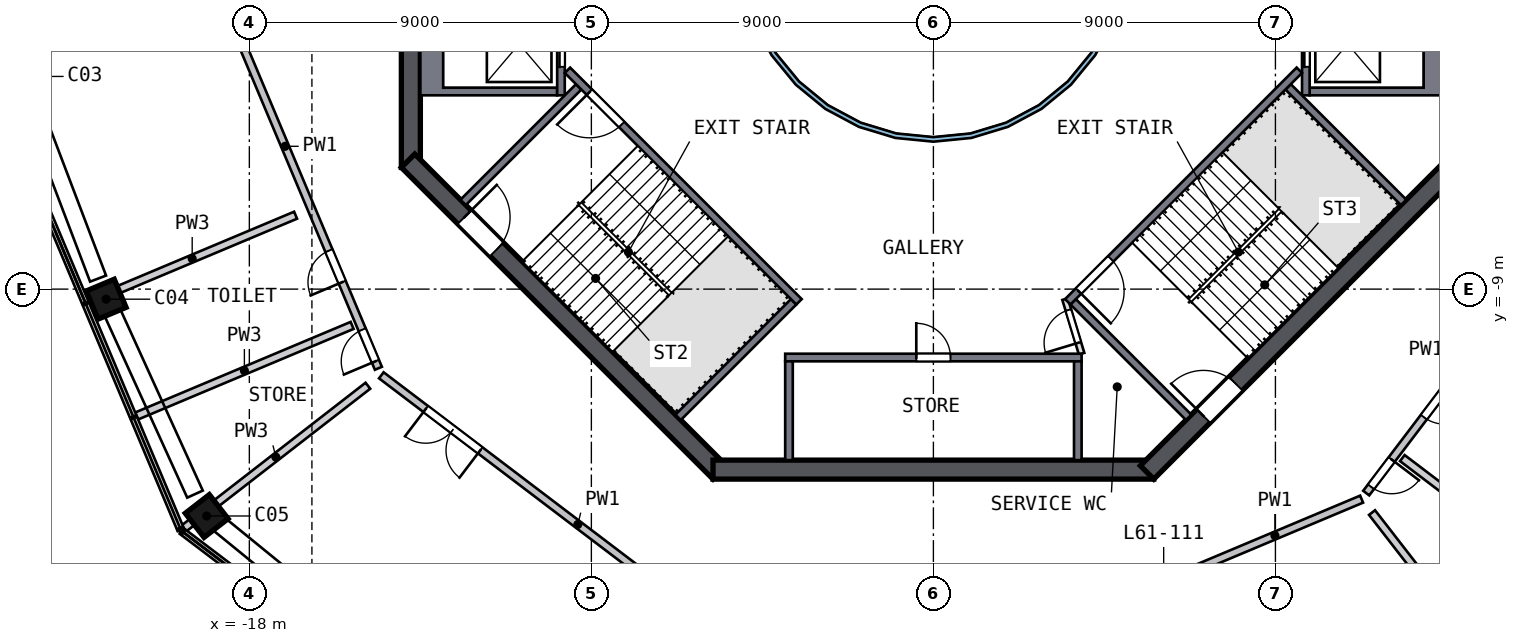
"""IFC4 building model, lengths in metres.
Left out: names, types, materials, properties, quantities, classifications, styles, units other than length and angle.
Written with IfcOpenShell. Run it as: python <this file> out.ifc"""

import sys

from ifc_helpers import new_model, si_unit, direction, frame, frame_2d, origin, origin_2d, place, context, subcontext, project, spatial, polyline, rectangle, outline, extrude, element, fill, save


model = new_model("IFC4")
c1 = context("Model", 3, precision=1e-05, world=origin(), true_north=direction((0.0, 1.0)))
c2 = subcontext(c1, "Body", "Model", "MODEL_VIEW")
j1 = project(units=[si_unit("LENGTHUNIT", "METRE"), si_unit("PLANEANGLEUNIT", "RADIAN")], contexts=[c1])
p1 = place(None, origin())
s1 = spatial("IfcSite", under=j1, at=p1, CompositionType="ELEMENT")
p2 = place(p1, origin())
s2 = spatial("IfcBuilding", under=s1, at=p2, CompositionType="ELEMENT")
p3 = place(p2, frame((0.0, 0.0, 248.0)))
s3 = spatial("IfcBuildingStorey", under=s2, at=p3, CompositionType="ELEMENT", Elevation=248.0)
p4 = place(p3, frame((-21.81, -9.168, 0.0), z_axis=(0.034709931, -0.080622231, 0.996140189), x_axis=(0.386169745, -0.918242206, -0.087773449)))
e1 = element("IfcColumn", 1, at=p4, inside=s3, PredefinedType="COLUMN", context=c2, shape_type="SweptSolid", body=[
    extrude(rectangle(XDim=0.8, YDim=0.8, at=origin_2d()), origin(), (0.0, 0.0, 1.0), 4.206),
])
p5 = place(p3, frame((-19.19, -14.885, 0.0), z_axis=(0.055826239, -0.070682286, 0.995935463), x_axis=(-0.610668678, 0.7867476, 0.090066533)))
e2 = element("IfcColumn", 2, at=p5, inside=s3, PredefinedType="COLUMN", context=c2, shape_type="SweptSolid", body=[
    extrude(rectangle(XDim=0.8, YDim=0.8, at=origin_2d()), origin(), (0.0, 0.0, 1.0), 4.207),
])
p6 = place(p3, frame((-13.75, 5.799, 0.0), z_axis=(0.0, 0.0, 1.0), x_axis=(0.0, -1.0, 0.0)))
e3 = element("IfcWall", 3, at=p6, inside=s3, PredefinedType="SHEAR", context=c2, shape_type="SweptSolid", body=[
    extrude(rectangle(XDim=11.598, YDim=0.5, at=frame_2d((5.799, 0.0))), origin(), (0.0, 0.0, 1.0), 4.5),
])
p7 = place(p6, frame((4.899, 0.0, 0.0)))
e4 = element("IfcOpeningElement", 4, at=p7, cuts=e3, PredefinedType="OPENING", context=c2, shape_type="SweptSolid", body=[
    extrude(rectangle(XDim=1.8, YDim=2.1, at=frame_2d((0.9, 1.05))), frame((0.0, 0.26, 0.0), z_axis=(0.0, -1.0, 0.0), x_axis=(1.0, 0.0, 0.0)), (0.0, 0.0, 1.0), 0.52),
])
p8 = place(p3, frame((-13.823, -5.622, 0.0), z_axis=(0.0, 0.0, 1.0), x_axis=(0.707106781, -0.707106781, 0.0)))
e5 = element("IfcWall", 5, at=p8, inside=s3, PredefinedType="SHEAR", context=c2, shape_type="SweptSolid", body=[
    extrude(rectangle(XDim=11.598, YDim=0.5, at=frame_2d((5.799, 0.0))), origin(), (0.0, 0.0, 1.0), 4.5),
])
p9 = place(p8, frame((2.099, 0.0, 0.0)))
e6 = element("IfcOpeningElement", 6, at=p9, cuts=e5, PredefinedType="OPENING", context=c2, shape_type="SweptSolid", body=[
    extrude(rectangle(XDim=1.2, YDim=2.1, at=frame_2d((0.6, 1.05))), frame((0.0, 0.26, 0.0), z_axis=(0.0, -1.0, 0.0), x_axis=(1.0, 0.0, 0.0)), (0.0, 0.0, 1.0), 0.52),
])
p10 = place(p3, frame((-5.799, -13.75, 0.0), z_axis=(0.0, 0.0, 1.0), x_axis=(1.0, 0.0, 0.0)))
e7 = element("IfcWall", 7, at=p10, inside=s3, PredefinedType="SHEAR", context=c2, shape_type="SweptSolid", body=[
    extrude(rectangle(XDim=11.598, YDim=0.5, at=frame_2d((5.799, 0.0))), origin(), (0.0, 0.0, 1.0), 4.5),
])
p11 = place(p3, frame((5.622, -13.823, 0.0), z_axis=(0.0, 0.0, 1.0), x_axis=(0.707106781, 0.707106781, 0.0)))
e8 = element("IfcWall", 8, at=p11, inside=s3, PredefinedType="SHEAR", context=c2, shape_type="SweptSolid", body=[
    extrude(rectangle(XDim=11.598, YDim=0.5, at=frame_2d((5.799, 0.0))), origin(), (0.0, 0.0, 1.0), 4.5),
])
p12 = place(p11, frame((2.099, 0.0, 0.0)))
e9 = element("IfcOpeningElement", 9, at=p12, cuts=e8, PredefinedType="OPENING", context=c2, shape_type="SweptSolid", body=[
    extrude(rectangle(XDim=1.2, YDim=2.1, at=frame_2d((0.6, 1.05))), frame((0.0, 0.26, 0.0), z_axis=(0.0, -1.0, 0.0), x_axis=(1.0, 0.0, 0.0)), (0.0, 0.0, 1.0), 0.52),
])
p13 = place(p3, origin())
e10 = element("IfcWall", 10, at=p13, inside=s3, PredefinedType="SOLIDWALL", context=c2, shape_type="SweptSolid", body=[
    extrude(outline(polyline([(13.5, -3.9), (9.9, -3.9), (9.9, -3.7), (12.9, -3.7), (12.9, -1.4), (9.9, -1.4), (9.9, -1.2), (13.5, -1.2), (13.5, -3.9)])), origin(), (0.0, 0.0, 1.0), 4.19),
])
p14 = place(p3, frame((9.8, -1.2, 0.0), z_axis=(0.0, 0.0, 1.0), x_axis=(0.0, -1.0, 0.0)))
e11 = element("IfcWall", 11, at=p14, inside=s3, PredefinedType="SOLIDWALL", context=c2, shape_type="SweptSolid", body=[
    extrude(rectangle(XDim=2.7, YDim=0.2, at=frame_2d((1.35, 0.0))), origin(), (0.0, 0.0, 1.0), 4.19),
])
p15 = place(p14, frame((0.75, 0.0, 0.0)))
e12 = element("IfcOpeningElement", 12, at=p15, cuts=e11, PredefinedType="OPENING", context=c2, shape_type="SweptSolid", body=[
    extrude(rectangle(XDim=1.2, YDim=2.1, at=frame_2d((0.6, 1.05))), frame((0.0, 0.11, 0.0), z_axis=(0.0, -1.0, 0.0), x_axis=(1.0, 0.0, 0.0)), (0.0, 0.0, 1.0), 0.22),
])
p16 = place(p3, origin())
e13 = element("IfcWall", 13, at=p16, inside=s3, PredefinedType="SOLIDWALL", context=c2, shape_type="SweptSolid", body=[
    extrude(outline(polyline([(-13.5, -3.9), (-13.5, -1.2), (-9.9, -1.2), (-9.9, -1.4), (-12.9, -1.4), (-12.9, -3.7), (-9.9, -3.7), (-9.9, -3.9), (-13.5, -3.9)])), origin(), (0.0, 0.0, 1.0), 4.19),
])
p17 = place(p3, frame((-9.8, -1.2, 0.0), z_axis=(0.0, 0.0, 1.0), x_axis=(0.0, -1.0, 0.0)))
e14 = element("IfcWall", 14, at=p17, inside=s3, PredefinedType="SOLIDWALL", context=c2, shape_type="SweptSolid", body=[
    extrude(rectangle(XDim=2.7, YDim=0.2, at=frame_2d((1.35, 0.0))), origin(), (0.0, 0.0, 1.0), 4.19),
])
p18 = place(p17, frame((0.75, 0.0, 0.0)))
e15 = element("IfcOpeningElement", 15, at=p18, cuts=e14, PredefinedType="OPENING", context=c2, shape_type="SweptSolid", body=[
    extrude(rectangle(XDim=1.2, YDim=2.1, at=frame_2d((0.6, 1.05))), frame((0.0, 0.11, 0.0), z_axis=(0.0, -1.0, 0.0), x_axis=(1.0, 0.0, 0.0)), (0.0, 0.0, 1.0), 0.22),
])
p19 = place(p3, frame((-3.9, -10.8, 0.0), z_axis=(0.0, 0.0, 1.0), x_axis=(1.0, 0.0, 0.0)))
e16 = element("IfcWall", 16, at=p19, inside=s3, PredefinedType="SOLIDWALL", context=c2, shape_type="SweptSolid", body=[
    extrude(rectangle(XDim=7.8, YDim=0.2, at=frame_2d((3.9, 0.0))), origin(), (0.0, 0.0, 1.0), 4.19),
])
p20 = place(p19, frame((3.45, 0.0, 0.0)))
e17 = element("IfcOpeningElement", 17, at=p20, cuts=e16, PredefinedType="OPENING", context=c2, shape_type="SweptSolid", body=[
    extrude(rectangle(XDim=0.9, YDim=2.1, at=frame_2d((0.45, 1.05))), frame((0.0, 0.11, 0.0), z_axis=(0.0, -1.0, 0.0), x_axis=(1.0, 0.0, 0.0)), (0.0, 0.0, 1.0), 0.22),
])
for number, where, z_axis, x_axis in (
    (18, (-3.8, -10.9, 0.0), (0.0, 0.0, 1.0), (0.0, -1.0, 0.0)),
    (19, (3.8, -10.9, 0.0), (0.0, 0.0, 1.0), (0.0, -1.0, 0.0)),
):
    element("IfcWall", number, at=place(p3, frame(where, z_axis=z_axis, x_axis=x_axis)), inside=s3, PredefinedType="SOLIDWALL", context=c2, shape_type="SweptSolid", body=[
        extrude(rectangle(XDim=2.6, YDim=0.2, at=frame_2d((1.3, 0.0))), origin(), (0.0, 0.0, 1.0), 4.19),
    ])
p21 = place(p3, frame((-3.535, -9.334, 0.0), z_axis=(0.0, 0.0, 1.0), x_axis=(-0.707120946, 0.707092617, 0.0)))
e20 = element("IfcWall", 20, at=p21, inside=s3, PredefinedType="SOLIDWALL", context=c2, shape_type="SweptSolid", body=[
    extrude(rectangle(XDim=8.618, YDim=0.2, at=frame_2d((4.309, 0.0))), origin(), (0.0, 0.0, 1.0), 4.19),
])
p22 = place(p21, frame((6.6, 0.0, 0.0)))
e21 = element("IfcOpeningElement", 21, at=p22, cuts=e20, PredefinedType="OPENING", context=c2, shape_type="SweptSolid", body=[
    extrude(rectangle(XDim=1.2, YDim=2.1, at=frame_2d((0.6, 1.05))), frame((0.0, 0.11, 0.0), z_axis=(0.0, -1.0, 0.0), x_axis=(1.0, 0.0, 0.0)), (0.0, 0.0, 1.0), 0.22),
])
for number, where, z_axis, x_axis in (
    (22, (-9.334, -3.677, 0.0), (0.0, 0.0, 1.0), (-0.707, -0.707, 0.0)),
    (23, (-3.677, -9.334, 0.0), (0.0, 0.0, 1.0), (-0.707, -0.707, 0.0)),
):
    element("IfcWall", number, at=place(p3, frame(where, z_axis=z_axis, x_axis=x_axis)), inside=s3, PredefinedType="SOLIDWALL", context=c2, shape_type="SweptSolid", body=[
        extrude(rectangle(XDim=4.3, YDim=0.2, at=frame_2d((2.15, 0.0))), origin(), (0.0, 0.0, 1.0), 4.19),
    ])
p23 = place(p3, frame((9.629, -3.24, 0.0), z_axis=(0.0, 0.0, 1.0), x_axis=(-0.707120946, -0.707092617, 0.0)))
e24 = element("IfcWall", 24, at=p23, inside=s3, PredefinedType="SOLIDWALL", context=c2, shape_type="SweptSolid", body=[
    extrude(rectangle(XDim=8.618, YDim=0.2, at=frame_2d((4.309, 0.0))), origin(), (0.0, 0.0, 1.0), 4.19),
])
p24 = place(p23, frame((7.018, 0.0, 0.0)))
e25 = element("IfcOpeningElement", 25, at=p24, cuts=e24, PredefinedType="OPENING", context=c2, shape_type="SweptSolid", body=[
    extrude(rectangle(XDim=1.2, YDim=2.1, at=frame_2d((0.6, 1.05))), frame((0.0, 0.11, 0.0), z_axis=(0.0, -1.0, 0.0), x_axis=(1.0, 0.0, 0.0)), (0.0, 0.0, 1.0), 0.22),
])
for number, where, z_axis, x_axis in (
    (26, (3.677, -9.334, 0.0), (0.0, 0.0, 1.0), (0.707, -0.707, 0.0)),
    (27, (9.334, -3.677, 0.0), (0.0, 0.0, 1.0), (0.707, -0.707, 0.0)),
):
    element("IfcWall", number, at=place(p3, frame(where, z_axis=z_axis, x_axis=x_axis)), inside=s3, PredefinedType="SOLIDWALL", context=c2, shape_type="SweptSolid", body=[
        extrude(rectangle(XDim=4.3, YDim=0.2, at=frame_2d((2.15, 0.0))), origin(), (0.0, 0.0, 1.0), 4.19),
    ])
p25 = place(p3, frame((3.9, -10.7, 0.0), z_axis=(0.0, 0.0, 1.0), x_axis=(-0.289808785, 0.957084567, 0.0)))
e28 = element("IfcWall", 28, at=p25, inside=s3, PredefinedType="PARTITIONING", context=c2, shape_type="SweptSolid", body=[
    extrude(rectangle(XDim=1.501, YDim=0.15, at=frame_2d((0.75, 0.0))), origin(), (0.0, 0.0, 1.0), 4.19),
])
p26 = place(p25, frame((0.301, 0.0, 0.0)))
e29 = element("IfcOpeningElement", 29, at=p26, cuts=e28, PredefinedType="OPENING", context=c2, shape_type="SweptSolid", body=[
    extrude(rectangle(XDim=0.9, YDim=2.1, at=frame_2d((0.45, 1.05))), frame((0.0, 0.085, 0.0), z_axis=(0.0, -1.0, 0.0), x_axis=(1.0, 0.0, 0.0)), (0.0, 0.0, 1.0), 0.17),
])
p27 = place(p3, origin())
e30 = element("IfcWall", 30, at=p27, inside=s3, PredefinedType="SOLIDWALL", context=c2, shape_type="SweptSolid", body=[
    extrude(outline(polyline([(5.021, -0.999), (4.73, -1.959), (4.257, -2.844), (3.62, -3.62), (2.844, -4.257), (1.959, -4.73), (0.999, -5.021), (0.0, -5.12), (-0.999, -5.021), (-1.959, -4.73), (-2.844, -4.257), (-3.62, -3.62), (-4.257, -2.844), (-4.73, -1.959), (-5.021, -0.999), (-5.12, 0.0), (-5.021, 0.999), (-4.73, 1.959), (-4.257, 2.844), (-3.62, 3.62), (-2.844, 4.257), (-1.959, 4.73), (-0.999, 5.021), (0.0, 5.12), (0.999, 5.021), (1.959, 4.73), (2.844, 4.257), (3.62, 3.62), (4.257, 2.844), (4.73, 1.959), (5.021, 0.999), (5.12, 0.0), (5.021, -0.999)]), holes=[polyline([(4.904, 0.976), (4.619, 1.913), (4.157, 2.778), (3.535, 3.535), (2.778, 4.157), (1.913, 4.619), (0.976, 4.904), (0.0, 5.0), (-0.976, 4.904), (-1.913, 4.619), (-2.778, 4.157), (-3.535, 3.535), (-4.157, 2.778), (-4.619, 1.913), (-4.904, 0.976), (-5.0, 0.0), (-4.904, -0.976), (-4.619, -1.913), (-4.157, -2.778), (-3.535, -3.535), (-2.778, -4.157), (-1.913, -4.619), (-0.976, -4.904), (0.0, -5.0), (0.976, -4.904), (1.913, -4.619), (2.778, -4.157), (3.535, -3.535), (4.157, -2.778), (4.619, -1.913), (4.904, -0.976), (5.0, 0.0), (4.904, 0.976)])]), origin(), (0.0, 0.0, 1.0), 4.19),
])
p28 = place(p3, frame((-14.604, -11.084, 0.0), z_axis=(0.0, 0.0, 1.0), x_axis=(-0.387522951, 0.921860056, 0.0)))
e31 = element("IfcWall", 31, at=p28, inside=s3, PredefinedType="SOLIDWALL", context=c2, shape_type="SweptSolid", body=[
    extrude(rectangle(XDim=9.116, YDim=0.2, at=frame_2d((4.558, 0.0))), origin(), (0.0, 0.0, 1.0), 4.19),
])
p29 = place(p28, frame((2.458, 0.0, 0.0)))
e32 = element("IfcOpeningElement", 32, at=p29, cuts=e31, PredefinedType="OPENING", context=c2, shape_type="SweptSolid", body=[
    extrude(rectangle(XDim=0.9, YDim=2.1, at=frame_2d((0.45, 1.05))), frame((0.0, 0.11, 0.0), z_axis=(0.0, -1.0, 0.0), x_axis=(1.0, 0.0, 0.0)), (0.0, 0.0, 1.0), 0.22),
])
p30 = place(p28, frame((0.2, 0.0, 0.0)))
e33 = element("IfcOpeningElement", 33, at=p30, cuts=e31, PredefinedType="OPENING", context=c2, shape_type="SweptSolid", body=[
    extrude(rectangle(XDim=0.9, YDim=2.1, at=frame_2d((0.45, 1.05))), frame((0.0, 0.11, 0.0), z_axis=(0.0, -1.0, 0.0), x_axis=(1.0, 0.0, 0.0)), (0.0, 0.0, 1.0), 0.22),
])
p31 = place(p3, frame((-6.947, -17.022, 0.0), z_axis=(0.0, 0.0, 1.0), x_axis=(-0.796535771, 0.604591404, 0.0)))
e34 = element("IfcWall", 34, at=p31, inside=s3, PredefinedType="SOLIDWALL", context=c2, shape_type="SweptSolid", body=[
    extrude(rectangle(XDim=9.517, YDim=0.2, at=frame_2d((4.758, 0.0))), origin(), (0.0, 0.0, 1.0), 4.19),
])
p32 = place(p31, frame((6.25, 0.0, 0.0)))
e35 = element("IfcOpeningElement", 35, at=p32, cuts=e34, PredefinedType="OPENING", context=c2, shape_type="SweptSolid", body=[
    extrude(rectangle(XDim=1.8, YDim=2.1, at=frame_2d((0.9, 1.05))), frame((0.0, 0.11, 0.0), z_axis=(0.0, -1.0, 0.0), x_axis=(1.0, 0.0, 0.0)), (0.0, 0.0, 1.0), 0.22),
])
p33 = place(p3, frame((11.268, -14.527, 0.0), z_axis=(0.0, 0.0, 1.0), x_axis=(-0.921862121, -0.387518038, 0.0)))
e36 = element("IfcWall", 36, at=p33, inside=s3, PredefinedType="SOLIDWALL", context=c2, shape_type="SweptSolid", body=[
    extrude(rectangle(XDim=9.317, YDim=0.2, at=frame_2d((4.658, 0.0))), origin(), (0.0, 0.0, 1.0), 4.19),
])
p34 = place(p33, frame((5.15, 0.0, 0.0)))
e37 = element("IfcOpeningElement", 37, at=p34, cuts=e36, PredefinedType="OPENING", context=c2, shape_type="SweptSolid", body=[
    extrude(rectangle(XDim=1.0, YDim=2.1, at=frame_2d((0.5, 1.05))), frame((0.0, 0.11, 0.0), z_axis=(0.0, -1.0, 0.0), x_axis=(1.0, 0.0, 0.0)), (0.0, 0.0, 1.0), 0.22),
])
p35 = place(p3, frame((16.901, -7.106, 0.0), z_axis=(0.0, 0.0, 1.0), x_axis=(-0.604596298, -0.796532056, 0.0)))
e38 = element("IfcWall", 38, at=p35, inside=s3, PredefinedType="SOLIDWALL", context=c2, shape_type="SweptSolid", body=[
    extrude(rectangle(XDim=9.116, YDim=0.2, at=frame_2d((4.558, 0.0))), origin(), (0.0, 0.0, 1.0), 4.19),
])
p36 = place(p35, frame((1.3, 0.0, 0.0)))
e39 = element("IfcOpeningElement", 39, at=p36, cuts=e38, PredefinedType="OPENING", context=c2, shape_type="SweptSolid", body=[
    extrude(rectangle(XDim=1.8, YDim=2.1, at=frame_2d((0.9, 1.05))), frame((0.0, 0.11, 0.0), z_axis=(0.0, -1.0, 0.0), x_axis=(1.0, 0.0, 0.0)), (0.0, 0.0, 1.0), 0.22),
])
p37 = place(p35, frame((8.008, 0.0, 0.0)))
e40 = element("IfcOpeningElement", 40, at=p37, cuts=e38, PredefinedType="OPENING", context=c2, shape_type="SweptSolid", body=[
    extrude(rectangle(XDim=0.9, YDim=2.1, at=frame_2d((0.45, 1.05))), frame((0.0, 0.11, 0.0), z_axis=(0.0, -1.0, 0.0), x_axis=(1.0, 0.0, 0.0)), (0.0, 0.0, 1.0), 0.22),
])
p38 = place(p35, frame((5.708, 0.0, 0.0)))
e41 = element("IfcOpeningElement", 41, at=p38, cuts=e38, PredefinedType="OPENING", context=c2, shape_type="SweptSolid", body=[
    extrude(rectangle(XDim=0.9, YDim=2.1, at=frame_2d((0.45, 1.05))), frame((0.0, 0.11, 0.0), z_axis=(0.0, -1.0, 0.0), x_axis=(1.0, 0.0, 0.0)), (0.0, 0.0, 1.0), 0.22),
])
p39 = place(p3, frame((-22.225, -9.342, 0.0), z_axis=(0.0, 0.0, 1.0), x_axis=(0.921869547, 0.387500372, 0.0)))
e42 = element("IfcWall", 42, at=p39, inside=s3, PredefinedType="SOLIDWALL", context=c2, shape_type="SweptSolid", body=[
    extrude(rectangle(XDim=5.903, YDim=0.2, at=frame_2d((2.951, 0.0))), origin(), (0.0, 0.0, 1.0), 4.19),
])
p40 = place(p3, frame((-15.296, -9.955, 0.0), z_axis=(0.0, 0.0, 1.0), x_axis=(-0.921857904, -0.387528071, 0.0)))
e43 = element("IfcWall", 43, at=p40, inside=s3, PredefinedType="SOLIDWALL", context=c2, shape_type="SweptSolid", body=[
    extrude(rectangle(XDim=6.15, YDim=0.2, at=frame_2d((3.075, 0.0))), origin(), (0.0, 0.0, 1.0), 4.19),
])
p41 = place(p3, frame((-19.725, -15.301, 0.0), z_axis=(0.0, 0.0, 1.0), x_axis=(0.790157627, 0.612903683, 0.0)))
e44 = element("IfcWall", 44, at=p41, inside=s3, PredefinedType="SOLIDWALL", context=c2, shape_type="SweptSolid", body=[
    extrude(rectangle(XDim=6.132, YDim=0.2, at=frame_2d((3.066, 0.0))), origin(), (0.0, 0.0, 1.0), 4.19),
])
p42 = place(p3, frame((15.301, -19.726, 0.0), z_axis=(0.0, 0.0, 1.0), x_axis=(-0.61290926, 0.790153301, 0.0)))
e45 = element("IfcWall", 45, at=p42, inside=s3, PredefinedType="SOLIDWALL", context=c2, shape_type="SweptSolid", body=[
    extrude(rectangle(XDim=6.132, YDim=0.2, at=frame_2d((3.066, 0.0))), origin(), (0.0, 0.0, 1.0), 4.19),
])
p43 = place(p3, frame((12.339, -13.446, 0.0), z_axis=(0.0, 0.0, 1.0), x_axis=(0.796533052, -0.604594986, 0.0)))
e46 = element("IfcWall", 46, at=p43, inside=s3, PredefinedType="SOLIDWALL", context=c2, shape_type="SweptSolid", body=[
    extrude(rectangle(XDim=6.15, YDim=0.2, at=frame_2d((3.075, 0.0))), origin(), (0.0, 0.0, 1.0), 4.19),
])
p44 = place(p20, origin())
e47 = element("IfcDoor", 47, at=p44, inside=s3, OperationType="SINGLE_SWING_LEFT", PredefinedType="DOOR", context=c2, shape_type="SweptSolid", body=[
    extrude(rectangle(XDim=0.9, YDim=2.1, at=frame_2d((0.45, 1.05))), frame((0.0, 0.025, 0.0), z_axis=(0.0, -1.0, 0.0), x_axis=(1.0, 0.0, 0.0)), (0.0, 0.0, 1.0), 0.05),
])
fill(e17, e47)
p45 = place(p15, origin())
e48 = element("IfcDoor", 48, at=p45, inside=s3, OperationType="DOUBLE_DOOR_SLIDING", PredefinedType="DOOR", context=c2, shape_type="SweptSolid", body=[
    extrude(rectangle(XDim=1.2, YDim=2.1, at=frame_2d((0.6, 1.05))), frame((0.0, 0.025, 0.0), z_axis=(0.0, -1.0, 0.0), x_axis=(1.0, 0.0, 0.0)), (0.0, 0.0, 1.0), 0.05),
])
fill(e12, e48)
p46 = place(p18, origin())
e49 = element("IfcDoor", 49, at=p46, inside=s3, OperationType="DOUBLE_DOOR_SLIDING", PredefinedType="DOOR", context=c2, shape_type="SweptSolid", body=[
    extrude(rectangle(XDim=1.2, YDim=2.1, at=frame_2d((0.6, 1.05))), frame((0.0, 0.025, 0.0), z_axis=(0.0, -1.0, 0.0), x_axis=(1.0, 0.0, 0.0)), (0.0, 0.0, 1.0), 0.05),
])
fill(e15, e49)
p47 = place(p22, origin())
e50 = element("IfcDoor", 50, at=p47, inside=s3, OperationType="SINGLE_SWING_RIGHT", PredefinedType="DOOR", context=c2, shape_type="SweptSolid", body=[
    extrude(rectangle(XDim=1.2, YDim=2.1, at=frame_2d((0.6, 1.05))), frame((0.0, 0.025, 0.0), z_axis=(0.0, -1.0, 0.0), x_axis=(1.0, 0.0, 0.0)), (0.0, 0.0, 1.0), 0.05),
])
fill(e21, e50)
p48 = place(p24, origin())
e51 = element("IfcDoor", 51, at=p48, inside=s3, OperationType="SINGLE_SWING_RIGHT", PredefinedType="DOOR", context=c2, shape_type="SweptSolid", body=[
    extrude(rectangle(XDim=1.2, YDim=2.1, at=frame_2d((0.6, 1.05))), frame((0.0, 0.025, 0.0), z_axis=(0.0, -1.0, 0.0), x_axis=(1.0, 0.0, 0.0)), (0.0, 0.0, 1.0), 0.05),
])
fill(e25, e51)
p49 = place(p9, origin())
e52 = element("IfcDoor", 52, at=p49, inside=s3, OperationType="SINGLE_SWING_LEFT", PredefinedType="DOOR", context=c2, shape_type="SweptSolid", body=[
    extrude(rectangle(XDim=1.2, YDim=2.1, at=frame_2d((0.6, 1.05))), frame((0.0, 0.025, 0.0), z_axis=(0.0, -1.0, 0.0), x_axis=(1.0, 0.0, 0.0)), (0.0, 0.0, 1.0), 0.05),
])
fill(e6, e52)
p50 = place(p12, origin())
e53 = element("IfcDoor", 53, at=p50, inside=s3, OperationType="SINGLE_SWING_LEFT", PredefinedType="DOOR", context=c2, shape_type="SweptSolid", body=[
    extrude(rectangle(XDim=1.2, YDim=2.1, at=frame_2d((0.6, 1.05))), frame((0.0, 0.025, 0.0), z_axis=(0.0, -1.0, 0.0), x_axis=(1.0, 0.0, 0.0)), (0.0, 0.0, 1.0), 0.05),
])
fill(e9, e53)
p51 = place(p26, origin())
e54 = element("IfcDoor", 54, at=p51, inside=s3, OperationType="SINGLE_SWING_LEFT", PredefinedType="DOOR", context=c2, shape_type="SweptSolid", body=[
    extrude(rectangle(XDim=0.9, YDim=2.1, at=frame_2d((0.45, 1.05))), frame((0.0, 0.025, 0.0), z_axis=(0.0, -1.0, 0.0), x_axis=(1.0, 0.0, 0.0)), (0.0, 0.0, 1.0), 0.05),
])
fill(e29, e54)
p52 = place(p32, origin())
e55 = element("IfcDoor", 55, at=p52, inside=s3, OperationType="DOUBLE_DOOR_SINGLE_SWING", PredefinedType="DOOR", context=c2, shape_type="SweptSolid", body=[
    extrude(rectangle(XDim=1.8, YDim=2.1, at=frame_2d((0.9, 1.05))), frame((0.0, 0.025, 0.0), z_axis=(0.0, -1.0, 0.0), x_axis=(1.0, 0.0, 0.0)), (0.0, 0.0, 1.0), 0.05),
])
fill(e35, e55)
p53 = place(p37, origin())
e56 = element("IfcDoor", 56, at=p53, inside=s3, OperationType="SINGLE_SWING_LEFT", PredefinedType="DOOR", context=c2, shape_type="SweptSolid", body=[
    extrude(rectangle(XDim=0.9, YDim=2.1, at=frame_2d((0.45, 1.05))), frame((0.0, 0.025, 0.0), z_axis=(0.0, -1.0, 0.0), x_axis=(1.0, 0.0, 0.0)), (0.0, 0.0, 1.0), 0.05),
])
fill(e40, e56)
p54 = place(p38, origin())
e57 = element("IfcDoor", 57, at=p54, inside=s3, OperationType="SINGLE_SWING_LEFT", PredefinedType="DOOR", context=c2, shape_type="SweptSolid", body=[
    extrude(rectangle(XDim=0.9, YDim=2.1, at=frame_2d((0.45, 1.05))), frame((0.0, 0.025, 0.0), z_axis=(0.0, -1.0, 0.0), x_axis=(1.0, 0.0, 0.0)), (0.0, 0.0, 1.0), 0.05),
])
fill(e41, e57)
p55 = place(p29, origin())
e58 = element("IfcDoor", 58, at=p55, inside=s3, OperationType="SINGLE_SWING_LEFT", PredefinedType="DOOR", context=c2, shape_type="SweptSolid", body=[
    extrude(rectangle(XDim=0.9, YDim=2.1, at=frame_2d((0.45, 1.05))), frame((0.0, 0.025, 0.0), z_axis=(0.0, -1.0, 0.0), x_axis=(1.0, 0.0, 0.0)), (0.0, 0.0, 1.0), 0.05),
])
fill(e32, e58)
p56 = place(p30, origin())
e59 = element("IfcDoor", 59, at=p56, inside=s3, OperationType="SINGLE_SWING_LEFT", PredefinedType="DOOR", context=c2, shape_type="SweptSolid", body=[
    extrude(rectangle(XDim=0.9, YDim=2.1, at=frame_2d((0.45, 1.05))), frame((0.0, 0.025, 0.0), z_axis=(0.0, -1.0, 0.0), x_axis=(1.0, 0.0, 0.0)), (0.0, 0.0, 1.0), 0.05),
])
fill(e33, e59)
save(model, sys.argv[1])
